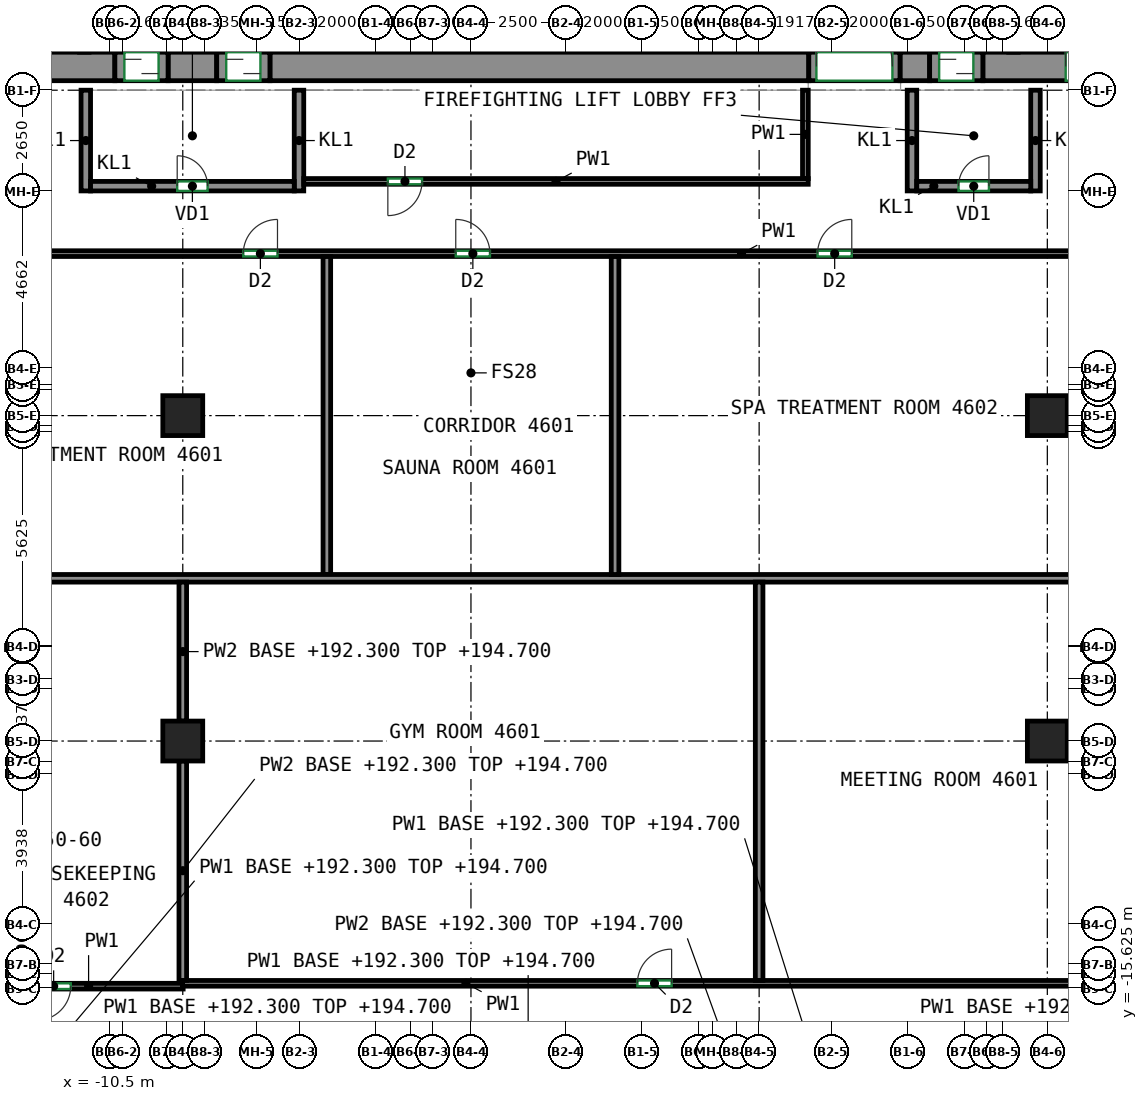
"""IFC4 building model, lengths in metres.
Left out: names, types, materials, properties, quantities, classifications, styles, units other than length and angle.
Written with IfcOpenShell. Run it as: python <this file> out.ifc"""

import sys

from ifc_helpers import new_model, si_unit, direction, frame, frame_2d, origin, origin_2d, place, context, subcontext, project, spatial, rectangle, extrude, source, transform, mapped, element, fill, save


model = new_model("IFC4")
c1 = context("Model", 3, precision=1e-05, world=origin(), true_north=direction((0.0, 1.0)))
c2 = subcontext(c1, "Body", "Model", "MODEL_VIEW")
j1 = project(units=[si_unit("LENGTHUNIT", "METRE"), si_unit("PLANEANGLEUNIT", "RADIAN")], contexts=[c1])
p1 = place(None, origin())
s1 = spatial("IfcSite", under=j1, at=p1, CompositionType="ELEMENT")
p2 = place(p1, origin())
s2 = spatial("IfcBuilding", under=s1, at=p2, CompositionType="ELEMENT")
p3 = place(p2, frame((0.0, 0.0, 192.3)))
s3 = spatial("IfcBuildingStorey", under=s2, at=p3, CompositionType="ELEMENT", Elevation=192.3)
m1 = source(origin(), c2, "Body", "SweptSolid", [
    extrude(rectangle(XDim=1.05, YDim=1.05, at=origin_2d()), origin(), (0.0, 0.0, 1.0), 3.0),
])
for number, where, z_axis, x_axis in (
    (1, (-8.583, -9.125, 0.0), (0.0, 0.0, 1.0), (1.0, 0.0, 0.0)),
    (2, (-8.583, -0.562, 0.0), (0.0, 0.0, 1.0), (1.0, 0.0, 0.0)),
    (3, (14.167, -9.125, 0.0), (0.0, 0.0, 1.0), (1.0, 0.0, 0.0)),
    (4, (14.167, -0.562, 0.0), (0.0, 0.0, 1.0), (1.0, 0.0, 0.0)),
):
    element("IfcColumn", number, at=place(p3, frame(where, z_axis=z_axis, x_axis=x_axis)), inside=s3, PredefinedType="COLUMN", context=c2, shape_type="MappedRepresentation", body=[
        mapped(m1, transform((0.0, 0.0, 0.0))),
    ])
m2 = source(origin(), c2, "Body", "SweptSolid", [
    extrude(rectangle(XDim=5.38, YDim=0.75, at=frame_2d((2.69, 0.0))), origin(), (0.0, 0.0, 1.0), 3.0),
])
p4 = place(p3, frame((-15.75, 8.625, 0.0), z_axis=(0.0, 0.0, 1.0), x_axis=(1.0, 0.0, 0.0)))
e5 = element("IfcWall", 5, at=p4, inside=s3, PredefinedType="SHEAR", context=c2, shape_type="MappedRepresentation", body=[
    mapped(m2, transform((0.0, 0.0, 0.0))),
])
p5 = place(p4, frame((2.0, 0.0, 0.0)))
e6 = element("IfcOpeningElement", 6, at=p5, cuts=e5, PredefinedType="OPENING", context=c2, shape_type="SweptSolid", body=[
    extrude(rectangle(XDim=1.2, YDim=2.1, at=frame_2d((0.6, 1.05))), frame((0.0, 0.385, 0.0), z_axis=(0.0, -1.0, 0.0), x_axis=(1.0, 0.0, 0.0)), (0.0, 0.0, 1.0), 0.77),
])
m3 = source(origin(), c2, "Body", "SweptSolid", [
    extrude(rectangle(XDim=1.28, YDim=0.75, at=frame_2d((0.64, 0.0))), origin(), (0.0, 0.0, 1.0), 3.0),
])
p6 = place(p3, frame((-8.97, 8.625, 0.0), z_axis=(0.0, 0.0, 1.0), x_axis=(1.0, 0.0, 0.0)))
e7 = element("IfcWall", 7, at=p6, inside=s3, PredefinedType="SHEAR", context=c2, shape_type="MappedRepresentation", body=[
    mapped(m3, transform((0.0, 0.0, 0.0))),
])
m4 = source(origin(), c2, "Body", "SweptSolid", [
    extrude(rectangle(XDim=14.18, YDim=0.75, at=frame_2d((7.09, 0.0))), origin(), (0.0, 0.0, 1.0), 3.0),
])
p7 = place(p3, frame((-6.29, 8.625, 0.0), z_axis=(0.0, 0.0, 1.0), x_axis=(1.0, 0.0, 0.0)))
e8 = element("IfcWall", 8, at=p7, inside=s3, PredefinedType="SHEAR", context=c2, shape_type="MappedRepresentation", body=[
    mapped(m4, transform((0.0, 0.0, 0.0))),
])
m5 = source(origin(), c2, "Body", "SweptSolid", [
    extrude(rectangle(XDim=0.78, YDim=0.75, at=frame_2d((0.39, 0.0))), origin(), (0.0, 0.0, 1.0), 3.0),
])
p8 = place(p3, frame((10.29, 8.625, 0.0), z_axis=(0.0, 0.0, 1.0), x_axis=(1.0, 0.0, 0.0)))
e9 = element("IfcWall", 9, at=p8, inside=s3, PredefinedType="SHEAR", context=c2, shape_type="MappedRepresentation", body=[
    mapped(m5, transform((0.0, 0.0, 0.0))),
])
m6 = source(origin(), c2, "Body", "SweptSolid", [
    extrude(rectangle(XDim=5.38, YDim=0.75, at=frame_2d((2.69, 0.0))), origin(), (0.0, 0.0, 1.0), 3.0),
])
p9 = place(p3, frame((12.47, 8.625, 0.0), z_axis=(0.0, 0.0, 1.0), x_axis=(1.0, 0.0, 0.0)))
e10 = element("IfcWall", 10, at=p9, inside=s3, PredefinedType="SHEAR", context=c2, shape_type="MappedRepresentation", body=[
    mapped(m6, transform((0.0, 0.0, 0.0))),
])
p10 = place(p9, frame((2.18, 0.0, 0.0)))
e11 = element("IfcOpeningElement", 11, at=p10, cuts=e10, PredefinedType="OPENING", context=c2, shape_type="SweptSolid", body=[
    extrude(rectangle(XDim=1.2, YDim=2.1, at=frame_2d((0.6, 1.05))), frame((0.0, 0.385, 0.0), z_axis=(0.0, -1.0, 0.0), x_axis=(1.0, 0.0, 0.0)), (0.0, 0.0, 1.0), 0.77),
])
m7 = source(origin(), c2, "Body", "SweptSolid", [
    extrude(rectangle(XDim=2.65, YDim=0.25, at=frame_2d((1.325, 0.0))), origin(), (0.0, 0.0, 1.0), 3.0),
])
for number, where, z_axis, x_axis in (
    (12, (-11.135, 5.35, 0.0), (0.0, 0.0, 1.0), (0.0, 1.0, 0.0)),
    (13, (-5.525, 5.35, 0.0), (0.0, 0.0, 1.0), (0.0, 1.0, 0.0)),
):
    element("IfcWall", number, at=place(p3, frame(where, z_axis=z_axis, x_axis=x_axis)), inside=s3, PredefinedType="PARTITIONING", context=c2, shape_type="MappedRepresentation", body=[
        mapped(m7, transform((0.0, 0.0, 0.0))),
    ])
m8 = source(origin(), c2, "Body", "SweptSolid", [
    extrude(rectangle(XDim=5.36, YDim=0.25, at=frame_2d((2.68, 0.0))), origin(), (0.0, 0.0, 1.0), 3.0),
])
p11 = place(p3, frame((-11.01, 5.475, 0.0), z_axis=(0.0, 0.0, 1.0), x_axis=(1.0, 0.0, 0.0)))
e14 = element("IfcWall", 14, at=p11, inside=s3, PredefinedType="PARTITIONING", context=c2, shape_type="MappedRepresentation", body=[
    mapped(m8, transform((0.0, 0.0, 0.0))),
])
p12 = place(p11, frame((2.28, 0.0, 0.0)))
e15 = element("IfcOpeningElement", 15, at=p12, cuts=e14, PredefinedType="OPENING", context=c2, shape_type="SweptSolid", body=[
    extrude(rectangle(XDim=0.8, YDim=2.0, at=frame_2d((0.4, 1.0))), frame((0.0, 0.135, 0.0), z_axis=(0.0, -1.0, 0.0), x_axis=(1.0, 0.0, 0.0)), (0.0, 0.0, 1.0), 0.27),
])
for number, where, z_axis, x_axis in (
    (16, (10.605, 5.35, 0.0), (0.0, 0.0, 1.0), (0.0, 1.0, 0.0)),
    (17, (13.855, 5.35, 0.0), (0.0, 0.0, 1.0), (0.0, 1.0, 0.0)),
):
    element("IfcWall", number, at=place(p3, frame(where, z_axis=z_axis, x_axis=x_axis)), inside=s3, PredefinedType="PARTITIONING", context=c2, shape_type="MappedRepresentation", body=[
        mapped(m7, transform((0.0, 0.0, 0.0))),
    ])
m9 = source(origin(), c2, "Body", "SweptSolid", [
    extrude(rectangle(XDim=3.0, YDim=0.25, at=frame_2d((1.5, 0.0))), origin(), (0.0, 0.0, 1.0), 3.0),
])
p13 = place(p3, frame((10.73, 5.475, 0.0), z_axis=(0.0, 0.0, 1.0), x_axis=(1.0, 0.0, 0.0)))
e18 = element("IfcWall", 18, at=p13, inside=s3, PredefinedType="PARTITIONING", context=c2, shape_type="MappedRepresentation", body=[
    mapped(m9, transform((0.0, 0.0, 0.0))),
])
p14 = place(p13, frame((1.1, 0.0, 0.0)))
e19 = element("IfcOpeningElement", 19, at=p14, cuts=e18, PredefinedType="OPENING", context=c2, shape_type="SweptSolid", body=[
    extrude(rectangle(XDim=0.8, YDim=2.0, at=frame_2d((0.4, 1.0))), frame((0.0, 0.135, 0.0), z_axis=(0.0, -1.0, 0.0), x_axis=(1.0, 0.0, 0.0)), (0.0, 0.0, 1.0), 0.27),
])
m10 = source(origin(), c2, "Body", "SweptSolid", [
    extrude(rectangle(XDim=1.4, YDim=0.75, at=frame_2d((0.7, 0.0))), origin(), (0.0, 0.0, 1.0), 2.7),
])
p15 = place(p3, frame((-10.37, 8.625, 0.0), z_axis=(0.0, 0.0, 1.0), x_axis=(1.0, 0.0, 0.0)))
e20 = element("IfcWall", 20, at=p15, inside=s3, PredefinedType="PARTITIONING", context=c2, shape_type="MappedRepresentation", body=[
    mapped(m10, transform((0.0, 0.0, 0.0))),
])
p16 = place(p15, frame((0.25, 0.0, 0.0)))
e21 = element("IfcOpeningElement", 21, at=p16, cuts=e20, PredefinedType="OPENING", context=c2, shape_type="SweptSolid", body=[
    extrude(rectangle(XDim=0.9, YDim=2.1, at=frame_2d((0.45, 1.05))), frame((0.0, 0.385, 0.0), z_axis=(0.0, -1.0, 0.0), x_axis=(1.0, 0.0, 0.0)), (0.0, 0.0, 1.0), 0.77),
])
m11 = source(origin(), c2, "Body", "SweptSolid", [
    extrude(rectangle(XDim=1.4, YDim=0.75, at=frame_2d((0.7, 0.0))), origin(), (0.0, 0.0, 1.0), 2.7),
])
p17 = place(p3, frame((-7.69, 8.625, 0.0), z_axis=(0.0, 0.0, 1.0), x_axis=(1.0, 0.0, 0.0)))
e22 = element("IfcWall", 22, at=p17, inside=s3, PredefinedType="PARTITIONING", context=c2, shape_type="MappedRepresentation", body=[
    mapped(m11, transform((0.0, 0.0, 0.0))),
])
p18 = place(p17, frame((0.25, 0.0, 0.0)))
e23 = element("IfcOpeningElement", 23, at=p18, cuts=e22, PredefinedType="OPENING", context=c2, shape_type="SweptSolid", body=[
    extrude(rectangle(XDim=0.9, YDim=2.1, at=frame_2d((0.45, 1.05))), frame((0.0, 0.385, 0.0), z_axis=(0.0, -1.0, 0.0), x_axis=(1.0, 0.0, 0.0)), (0.0, 0.0, 1.0), 0.77),
])
m12 = source(origin(), c2, "Body", "SweptSolid", [
    extrude(rectangle(XDim=2.4, YDim=0.75, at=frame_2d((1.2, 0.0))), origin(), (0.0, 0.0, 1.0), 2.7),
])
p19 = place(p3, frame((7.89, 8.625, 0.0), z_axis=(0.0, 0.0, 1.0), x_axis=(1.0, 0.0, 0.0)))
e24 = element("IfcWall", 24, at=p19, inside=s3, PredefinedType="PARTITIONING", context=c2, shape_type="MappedRepresentation", body=[
    mapped(m12, transform((0.0, 0.0, 0.0))),
])
p20 = place(p19, frame((0.2, 0.0, 0.0)))
e25 = element("IfcOpeningElement", 25, at=p20, cuts=e24, PredefinedType="OPENING", context=c2, shape_type="SweptSolid", body=[
    extrude(rectangle(XDim=2.0, YDim=2.1, at=frame_2d((1.0, 1.05))), frame((0.0, 0.385, 0.0), z_axis=(0.0, -1.0, 0.0), x_axis=(1.0, 0.0, 0.0)), (0.0, 0.0, 1.0), 0.77),
])
p21 = place(p3, frame((11.07, 8.625, 0.0), z_axis=(0.0, 0.0, 1.0), x_axis=(1.0, 0.0, 0.0)))
e26 = element("IfcWall", 26, at=p21, inside=s3, PredefinedType="PARTITIONING", context=c2, shape_type="MappedRepresentation", body=[
    mapped(m11, transform((0.0, 0.0, 0.0))),
])
p22 = place(p21, frame((0.25, 0.0, 0.0)))
e27 = element("IfcOpeningElement", 27, at=p22, cuts=e26, PredefinedType="OPENING", context=c2, shape_type="SweptSolid", body=[
    extrude(rectangle(XDim=0.9, YDim=2.1, at=frame_2d((0.45, 1.05))), frame((0.0, 0.385, 0.0), z_axis=(0.0, -1.0, 0.0), x_axis=(1.0, 0.0, 0.0)), (0.0, 0.0, 1.0), 0.77),
])
p23 = place(p3, frame((7.875, 5.6, 0.0), z_axis=(0.0, 0.0, 1.0), x_axis=(-1.0, 0.0, 0.0)))
e28 = element("IfcWall", 28, at=p23, inside=s3, PredefinedType="PARTITIONING", context=c2, shape_type="SweptSolid", body=[
    extrude(rectangle(XDim=13.275, YDim=0.15, at=frame_2d((6.637, 0.0))), origin(), (0.0, 0.0, 1.0), 3.0),
])
p24 = place(p23, frame((10.162, 0.0, 0.0)))
e29 = element("IfcOpeningElement", 29, at=p24, cuts=e28, PredefinedType="OPENING", context=c2, shape_type="SweptSolid", body=[
    extrude(rectangle(XDim=0.9, YDim=2.1, at=frame_2d((0.45, 1.05))), frame((0.0, 0.085, 0.0), z_axis=(0.0, -1.0, 0.0), x_axis=(1.0, 0.0, 0.0)), (0.0, 0.0, 1.0), 0.17),
])
p25 = place(p3, frame((7.8, 8.0, 0.0), z_axis=(0.0, 0.0, 1.0), x_axis=(0.0, -1.0, 0.0)))
e30 = element("IfcWall", 30, at=p25, inside=s3, PredefinedType="PARTITIONING", context=c2, shape_type="SweptSolid", body=[
    extrude(rectangle(XDim=2.325, YDim=0.15, at=frame_2d((1.163, 0.0))), origin(), (0.0, 0.0, 1.0), 3.0),
])
p26 = place(p3, frame((-17.575, 3.7, 0.0), z_axis=(0.0, 0.0, 1.0), x_axis=(1.0, 0.0, 0.0)))
e31 = element("IfcWall", 31, at=p26, inside=s3, PredefinedType="PARTITIONING", context=c2, shape_type="SweptSolid", body=[
    extrude(rectangle(XDim=33.85, YDim=0.15, at=frame_2d((16.925, 0.0))), origin(), (0.0, 0.0, 1.0), 3.0),
])
p27 = place(p26, frame((10.584, 0.0, 0.0)))
e32 = element("IfcOpeningElement", 32, at=p27, cuts=e31, PredefinedType="OPENING", context=c2, shape_type="SweptSolid", body=[
    extrude(rectangle(XDim=0.9, YDim=2.1, at=frame_2d((0.45, 1.05))), frame((0.0, 0.085, 0.0), z_axis=(0.0, -1.0, 0.0), x_axis=(1.0, 0.0, 0.0)), (0.0, 0.0, 1.0), 0.17),
])
p28 = place(p26, frame((16.175, 0.0, 0.0)))
e33 = element("IfcOpeningElement", 33, at=p28, cuts=e31, PredefinedType="OPENING", context=c2, shape_type="SweptSolid", body=[
    extrude(rectangle(XDim=0.9, YDim=2.1, at=frame_2d((0.45, 1.05))), frame((0.0, 0.085, 0.0), z_axis=(0.0, -1.0, 0.0), x_axis=(1.0, 0.0, 0.0)), (0.0, 0.0, 1.0), 0.17),
])
p29 = place(p26, frame((25.696, 0.0, 0.0)))
e34 = element("IfcOpeningElement", 34, at=p29, cuts=e31, PredefinedType="OPENING", context=c2, shape_type="SweptSolid", body=[
    extrude(rectangle(XDim=0.9, YDim=2.1, at=frame_2d((0.45, 1.05))), frame((0.0, 0.085, 0.0), z_axis=(0.0, -1.0, 0.0), x_axis=(1.0, 0.0, 0.0)), (0.0, 0.0, 1.0), 0.17),
])
p30 = place(p3, frame((-8.573, -15.575, 0.0), z_axis=(0.0, 0.0, 1.0), x_axis=(-1.0, 0.0, 0.0)))
e35 = element("IfcWall", 35, at=p30, inside=s3, PredefinedType="PARTITIONING", context=c2, shape_type="SweptSolid", body=[
    extrude(rectangle(XDim=4.977, YDim=0.15, at=frame_2d((2.489, 0.0))), origin(), (0.0, 0.0, 1.0), 3.0),
])
p31 = place(p30, frame((2.958, 0.0, 0.0)))
e36 = element("IfcOpeningElement", 36, at=p31, cuts=e35, PredefinedType="OPENING", context=c2, shape_type="SweptSolid", body=[
    extrude(rectangle(XDim=0.9, YDim=2.1, at=frame_2d((0.45, 1.05))), frame((0.0, 0.085, 0.0), z_axis=(0.0, -1.0, 0.0), x_axis=(1.0, 0.0, 0.0)), (0.0, 0.0, 1.0), 0.17),
])
p32 = place(p3, frame((-8.593, -15.5, 0.0), z_axis=(0.0, 0.0, 1.0), x_axis=(1.0, 0.0, 0.0)))
e37 = element("IfcWall", 37, at=p32, inside=s3, PredefinedType="PARTITIONING", context=c2, shape_type="SweptSolid", body=[
    extrude(rectangle(XDim=24.868, YDim=0.15, at=frame_2d((12.434, 0.0))), origin(), (0.0, 0.0, 1.0), 3.0),
])
p33 = place(p32, frame((11.973, 0.0, 0.0)))
e38 = element("IfcOpeningElement", 38, at=p33, cuts=e37, PredefinedType="OPENING", context=c2, shape_type="SweptSolid", body=[
    extrude(rectangle(XDim=0.9, YDim=2.1, at=frame_2d((0.45, 1.05))), frame((0.0, 0.085, 0.0), z_axis=(0.0, -1.0, 0.0), x_axis=(1.0, 0.0, 0.0)), (0.0, 0.0, 1.0), 0.17),
])
p34 = place(p3, frame((-4.792, -4.743, 0.0), z_axis=(0.0, 0.0, 1.0), x_axis=(0.0, 1.0, 0.0)))
e39 = element("IfcWall", 39, at=p34, inside=s3, PredefinedType="PARTITIONING", context=c2, shape_type="SweptSolid", body=[
    extrude(rectangle(XDim=8.366, YDim=0.2, at=frame_2d((4.183, 0.0))), origin(), (0.0, 0.0, 1.0), 3.0),
])
p35 = place(p3, frame((-13.873, -4.843, 0.0), z_axis=(0.0, 0.0, 1.0), x_axis=(1.0, 0.0, 0.0)))
e40 = element("IfcWall", 40, at=p35, inside=s3, PredefinedType="PARTITIONING", context=c2, shape_type="SweptSolid", body=[
    extrude(rectangle(XDim=30.146, YDim=0.2, at=frame_2d((15.073, 0.0))), origin(), (0.0, 0.0, 1.0), 3.0),
])
p36 = place(p3, frame((2.792, -4.743, 0.0), z_axis=(0.0, 0.0, 1.0), x_axis=(0.0, 1.0, 0.0)))
e41 = element("IfcWall", 41, at=p36, inside=s3, PredefinedType="PARTITIONING", context=c2, shape_type="SweptSolid", body=[
    extrude(rectangle(XDim=8.366, YDim=0.2, at=frame_2d((4.183, 0.0))), origin(), (0.0, 0.0, 1.0), 3.0),
])
p37 = place(p3, frame((-8.583, -8.6, 0.0), z_axis=(0.0, 0.0, 1.0), x_axis=(0.0, 1.0, 0.0)))
e42 = element("IfcWall", 42, at=p37, inside=s3, PredefinedType="PARTITIONING", context=c2, shape_type="SweptSolid", body=[
    extrude(rectangle(XDim=3.657, YDim=0.2, at=frame_2d((1.829, 0.0))), origin(), (0.0, 0.0, 1.0), 2.4),
])
p38 = place(p3, frame((-8.583, -15.423, 0.0), z_axis=(0.0, 0.0, 1.0), x_axis=(0.0, 1.0, 0.0)))
e43 = element("IfcWall", 43, at=p38, inside=s3, PredefinedType="PARTITIONING", context=c2, shape_type="SweptSolid", body=[
    extrude(rectangle(XDim=5.773, YDim=0.2, at=frame_2d((2.887, 0.0))), origin(), (0.0, 0.0, 1.0), 2.4),
])
p39 = place(p3, frame((6.583, -15.423, 0.0), z_axis=(0.0, 0.0, 1.0), x_axis=(0.0, 1.0, 0.0)))
e44 = element("IfcWall", 44, at=p39, inside=s3, PredefinedType="PARTITIONING", context=c2, shape_type="SweptSolid", body=[
    extrude(rectangle(XDim=10.48, YDim=0.2, at=frame_2d((5.24, 0.0))), origin(), (0.0, 0.0, 1.0), 3.0),
])
p40 = place(p20, origin())
e45 = element("IfcDoor", 45, at=p40, inside=s3, OperationType="DOUBLE_DOOR_SINGLE_SWING", PredefinedType="DOOR", context=c2, shape_type="SweptSolid", body=[
    extrude(rectangle(XDim=2.0, YDim=2.1, at=frame_2d((1.0, 1.05))), frame((0.0, 0.28, 0.0), z_axis=(0.0, -1.0, 0.0), x_axis=(1.0, 0.0, 0.0)), (0.0, 0.0, 1.0), 0.05),
])
fill(e25, e45)
p41 = place(p12, origin())
e46 = element("IfcDoor", 46, at=p41, inside=s3, OperationType="SINGLE_SWING_LEFT", PredefinedType="DOOR", context=c2, shape_type="SweptSolid", body=[
    extrude(rectangle(XDim=0.8, YDim=2.0, at=frame_2d((0.4, 1.0))), frame((0.0, 0.025, 0.0), z_axis=(0.0, -1.0, 0.0), x_axis=(1.0, 0.0, 0.0)), (0.0, 0.0, 1.0), 0.05),
])
fill(e15, e46)
p42 = place(p14, origin())
e47 = element("IfcDoor", 47, at=p42, inside=s3, OperationType="SINGLE_SWING_RIGHT", PredefinedType="DOOR", context=c2, shape_type="SweptSolid", body=[
    extrude(rectangle(XDim=0.8, YDim=2.0, at=frame_2d((0.4, 1.0))), frame((0.0, 0.025, 0.0), z_axis=(0.0, -1.0, 0.0), x_axis=(1.0, 0.0, 0.0)), (0.0, 0.0, 1.0), 0.05),
])
fill(e19, e47)
p43 = place(p16, origin())
e48 = element("IfcDoor", 48, at=p43, inside=s3, OperationType="SLIDING_TO_LEFT", PredefinedType="DOOR", context=c2, shape_type="SweptSolid", body=[
    extrude(rectangle(XDim=0.9, YDim=2.1, at=frame_2d((0.45, 1.05))), frame((0.0, 0.28, 0.0), z_axis=(0.0, -1.0, 0.0), x_axis=(1.0, 0.0, 0.0)), (0.0, 0.0, 1.0), 0.05),
])
fill(e21, e48)
p44 = place(p18, origin())
e49 = element("IfcDoor", 49, at=p44, inside=s3, OperationType="SLIDING_TO_RIGHT", PredefinedType="DOOR", context=c2, shape_type="SweptSolid", body=[
    extrude(rectangle(XDim=0.9, YDim=2.1, at=frame_2d((0.45, 1.05))), frame((0.0, 0.28, 0.0), z_axis=(0.0, -1.0, 0.0), x_axis=(1.0, 0.0, 0.0)), (0.0, 0.0, 1.0), 0.05),
])
fill(e23, e49)
p45 = place(p22, origin())
e50 = element("IfcDoor", 50, at=p45, inside=s3, OperationType="SLIDING_TO_LEFT", PredefinedType="DOOR", context=c2, shape_type="SweptSolid", body=[
    extrude(rectangle(XDim=0.9, YDim=2.1, at=frame_2d((0.45, 1.05))), frame((0.0, 0.28, 0.0), z_axis=(0.0, -1.0, 0.0), x_axis=(1.0, 0.0, 0.0)), (0.0, 0.0, 1.0), 0.05),
])
fill(e27, e50)
p46 = place(p10, origin())
e51 = element("IfcDoor", 51, at=p46, inside=s3, OperationType="DOUBLE_DOOR_SINGLE_SWING", PredefinedType="DOOR", context=c2, shape_type="SweptSolid", body=[
    extrude(rectangle(XDim=1.2, YDim=2.1, at=frame_2d((0.6, 1.05))), frame((0.0, 0.28, 0.0), z_axis=(0.0, -1.0, 0.0), x_axis=(1.0, 0.0, 0.0)), (0.0, 0.0, 1.0), 0.05),
])
fill(e11, e51)
p47 = place(p31, origin())
e52 = element("IfcDoor", 52, at=p47, inside=s3, OperationType="SINGLE_SWING_RIGHT", PredefinedType="DOOR", context=c2, shape_type="SweptSolid", body=[
    extrude(rectangle(XDim=0.9, YDim=2.1, at=frame_2d((0.45, 1.05))), frame((0.0, 0.025, 0.0), z_axis=(0.0, -1.0, 0.0), x_axis=(1.0, 0.0, 0.0)), (0.0, 0.0, 1.0), 0.05),
])
fill(e36, e52)
p48 = place(p33, origin())
e53 = element("IfcDoor", 53, at=p48, inside=s3, OperationType="SINGLE_SWING_RIGHT", PredefinedType="DOOR", context=c2, shape_type="SweptSolid", body=[
    extrude(rectangle(XDim=0.9, YDim=2.1, at=frame_2d((0.45, 1.05))), frame((0.0, 0.025, 0.0), z_axis=(0.0, -1.0, 0.0), x_axis=(1.0, 0.0, 0.0)), (0.0, 0.0, 1.0), 0.05),
])
fill(e38, e53)
p49 = place(p27, origin())
e54 = element("IfcDoor", 54, at=p49, inside=s3, OperationType="SINGLE_SWING_RIGHT", PredefinedType="DOOR", context=c2, shape_type="SweptSolid", body=[
    extrude(rectangle(XDim=0.9, YDim=2.1, at=frame_2d((0.45, 1.05))), frame((0.0, 0.025, 0.0), z_axis=(0.0, -1.0, 0.0), x_axis=(1.0, 0.0, 0.0)), (0.0, 0.0, 1.0), 0.05),
])
fill(e32, e54)
p50 = place(p28, origin())
e55 = element("IfcDoor", 55, at=p50, inside=s3, OperationType="SINGLE_SWING_LEFT", PredefinedType="DOOR", context=c2, shape_type="SweptSolid", body=[
    extrude(rectangle(XDim=0.9, YDim=2.1, at=frame_2d((0.45, 1.05))), frame((0.0, 0.025, 0.0), z_axis=(0.0, -1.0, 0.0), x_axis=(1.0, 0.0, 0.0)), (0.0, 0.0, 1.0), 0.05),
])
fill(e33, e55)
p51 = place(p29, origin())
e56 = element("IfcDoor", 56, at=p51, inside=s3, OperationType="SINGLE_SWING_RIGHT", PredefinedType="DOOR", context=c2, shape_type="SweptSolid", body=[
    extrude(rectangle(XDim=0.9, YDim=2.1, at=frame_2d((0.45, 1.05))), frame((0.0, 0.025, 0.0), z_axis=(0.0, -1.0, 0.0), x_axis=(1.0, 0.0, 0.0)), (0.0, 0.0, 1.0), 0.05),
])
fill(e34, e56)
p52 = place(p24, origin())
e57 = element("IfcDoor", 57, at=p52, inside=s3, OperationType="SINGLE_SWING_RIGHT", PredefinedType="DOOR", context=c2, shape_type="SweptSolid", body=[
    extrude(rectangle(XDim=0.9, YDim=2.1, at=frame_2d((0.45, 1.05))), frame((0.0, 0.025, 0.0), z_axis=(0.0, -1.0, 0.0), x_axis=(1.0, 0.0, 0.0)), (0.0, 0.0, 1.0), 0.05),
])
fill(e29, e57)
save(model, sys.argv[1])
